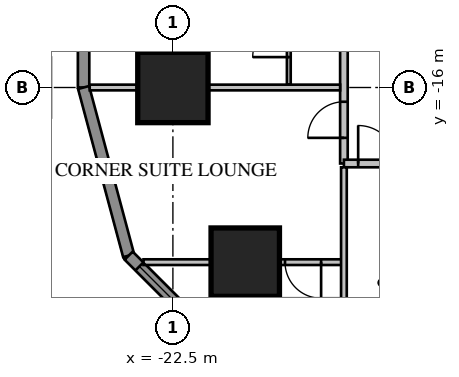
"""IFC4 building model, lengths in metres.
Left out: names, types, materials, properties, quantities, classifications, styles, units other than length and angle.
Written with IfcOpenShell. Run it as: python <this file> out.ifc"""

import sys

from ifc_helpers import new_model, si_unit, direction, frame, frame_2d, origin, origin_2d, place, context, subcontext, project, spatial, rectangle, extrude, element, fill, save


model = new_model("IFC4")
c1 = context("Model", 3, precision=1e-05, world=origin(), true_north=direction((0.0, 1.0)))
c2 = subcontext(c1, "Body", "Model", "MODEL_VIEW")
j1 = project(units=[si_unit("LENGTHUNIT", "METRE"), si_unit("PLANEANGLEUNIT", "RADIAN")], contexts=[c1])
p1 = place(None, origin())
s1 = spatial("IfcSite", under=j1, at=p1, CompositionType="ELEMENT")
p2 = place(p1, origin())
s2 = spatial("IfcBuilding", under=s1, at=p2, CompositionType="ELEMENT")
p3 = place(p2, frame((0.0, 0.0, 39.1)))
s3 = spatial("IfcBuildingStorey", under=s2, at=p3, CompositionType="ELEMENT", Elevation=39.1)
p4 = place(p3, frame((-22.5, -16.0, 0.0), z_axis=(0.0, 0.0, 1.0), x_axis=(1.0, 0.0, 0.0)))
e1 = element("IfcColumn", 1, at=p4, inside=s3, PredefinedType="COLUMN", context=c2, shape_type="SweptSolid", body=[
    extrude(rectangle(XDim=1.85, YDim=1.85, at=origin_2d()), origin(), (0.0, 0.0, 1.0), 3.85),
])
p5 = place(p3, frame((-20.596, -20.596, 0.0), z_axis=(0.0, 0.0, 1.0), x_axis=(1.0, 0.0, 0.0)))
e2 = element("IfcColumn", 2, at=p5, inside=s3, PredefinedType="COLUMN", context=c2, shape_type="SweptSolid", body=[
    extrude(rectangle(XDim=1.8, YDim=1.8, at=origin_2d()), origin(), (0.0, 0.0, 1.0), 3.85),
])
p6 = place(p3, frame((-24.85, 16.0, 0.0), z_axis=(0.0, 0.0, 1.0), x_axis=(0.0, -1.0, 0.0)))
e3 = element("IfcWall", 3, at=p6, inside=s3, PredefinedType="SOLIDWALL", context=c2, shape_type="SweptSolid", body=[
    extrude(rectangle(XDim=32.0, YDim=0.3, at=frame_2d((16.0, 0.0))), origin(), (0.0, 0.0, 1.0), 3.65),
])
p7 = place(p6, frame((1.2, 0.0, 0.75)))
e4 = element("IfcOpeningElement", 4, at=p7, cuts=e3, PredefinedType="OPENING", context=c2, shape_type="SweptSolid", body=[
    extrude(rectangle(XDim=1.6, YDim=1.8, at=frame_2d((0.8, 0.9))), frame((0.0, 0.17, 0.0), z_axis=(0.0, -1.0, 0.0), x_axis=(1.0, 0.0, 0.0)), (0.0, 0.0, 1.0), 0.34),
])
p8 = place(p6, frame((5.2, 0.0, 0.75)))
e5 = element("IfcOpeningElement", 5, at=p8, cuts=e3, PredefinedType="OPENING", context=c2, shape_type="SweptSolid", body=[
    extrude(rectangle(XDim=1.6, YDim=1.8, at=frame_2d((0.8, 0.9))), frame((0.0, 0.17, 0.0), z_axis=(0.0, -1.0, 0.0), x_axis=(1.0, 0.0, 0.0)), (0.0, 0.0, 1.0), 0.34),
])
p9 = place(p6, frame((17.2, 0.0, 0.75)))
e6 = element("IfcOpeningElement", 6, at=p9, cuts=e3, PredefinedType="OPENING", context=c2, shape_type="SweptSolid", body=[
    extrude(rectangle(XDim=1.6, YDim=1.8, at=frame_2d((0.8, 0.9))), frame((0.0, 0.17, 0.0), z_axis=(0.0, -1.0, 0.0), x_axis=(1.0, 0.0, 0.0)), (0.0, 0.0, 1.0), 0.34),
])
p10 = place(p6, frame((21.2, 0.0, 0.75)))
e7 = element("IfcOpeningElement", 7, at=p10, cuts=e3, PredefinedType="OPENING", context=c2, shape_type="SweptSolid", body=[
    extrude(rectangle(XDim=1.6, YDim=1.8, at=frame_2d((0.8, 0.9))), frame((0.0, 0.17, 0.0), z_axis=(0.0, -1.0, 0.0), x_axis=(1.0, 0.0, 0.0)), (0.0, 0.0, 1.0), 0.34),
])
p11 = place(p6, frame((25.2, 0.0, 0.75)))
e8 = element("IfcOpeningElement", 8, at=p11, cuts=e3, PredefinedType="OPENING", context=c2, shape_type="SweptSolid", body=[
    extrude(rectangle(XDim=1.6, YDim=1.8, at=frame_2d((0.8, 0.9))), frame((0.0, 0.17, 0.0), z_axis=(0.0, -1.0, 0.0), x_axis=(1.0, 0.0, 0.0)), (0.0, 0.0, 1.0), 0.34),
])
p12 = place(p6, frame((29.2, 0.0, 0.75)))
e9 = element("IfcOpeningElement", 9, at=p12, cuts=e3, PredefinedType="OPENING", context=c2, shape_type="SweptSolid", body=[
    extrude(rectangle(XDim=1.6, YDim=1.8, at=frame_2d((0.8, 0.9))), frame((0.0, 0.17, 0.0), z_axis=(0.0, -1.0, 0.0), x_axis=(1.0, 0.0, 0.0)), (0.0, 0.0, 1.0), 0.34),
])
p13 = place(p6, frame((8.8, 0.0, 0.75)))
e10 = element("IfcOpeningElement", 10, at=p13, cuts=e3, PredefinedType="OPENING", context=c2, shape_type="SweptSolid", body=[
    extrude(rectangle(XDim=2.4, YDim=1.8, at=frame_2d((1.2, 0.9))), frame((0.0, 0.17, 0.0), z_axis=(0.0, -1.0, 0.0), x_axis=(1.0, 0.0, 0.0)), (0.0, 0.0, 1.0), 0.34),
])
p14 = place(p6, frame((13.812, 0.0, 0.0)))
e11 = element("IfcOpeningElement", 11, at=p14, cuts=e3, PredefinedType="OPENING", context=c2, shape_type="SweptSolid", body=[
    extrude(rectangle(XDim=1.0, YDim=2.4, at=frame_2d((0.5, 1.2))), frame((0.0, 0.17, 0.0), z_axis=(0.0, -1.0, 0.0), x_axis=(1.0, 0.0, 0.0)), (0.0, 0.0, 1.0), 0.34),
])
p15 = place(p3, frame((-24.85, -16.0, 0.0), z_axis=(0.0, 0.0, 1.0), x_axis=(0.258839972501, -0.965920218567, 0.0)))
e12 = element("IfcWall", 12, at=p15, inside=s3, PredefinedType="SOLIDWALL", context=c2, shape_type="SweptSolid", body=[
    extrude(rectangle(XDim=4.581, YDim=0.3, at=frame_2d((2.291, 0.0))), origin(), (0.0, 0.0, 1.0), 3.65),
])
p16 = place(p3, frame((-23.664, -20.425, 0.0), z_axis=(0.0, 0.0, 1.0), x_axis=(0.707106781187, -0.707106781187, 0.0)))
e13 = element("IfcWall", 13, at=p16, inside=s3, PredefinedType="SOLIDWALL", context=c2, shape_type="SweptSolid", body=[
    extrude(rectangle(XDim=4.581, YDim=0.3, at=frame_2d((2.291, 0.0))), origin(), (0.0, 0.0, 1.0), 3.65),
])
p17 = place(p16, frame((0.4, 0.0, 0.75)))
e14 = element("IfcOpeningElement", 14, at=p17, cuts=e13, PredefinedType="OPENING", context=c2, shape_type="SweptSolid", body=[
    extrude(rectangle(XDim=3.781, YDim=1.8, at=frame_2d((1.891, 0.9))), frame((0.0, 0.17, 0.0), z_axis=(0.0, -1.0, 0.0), x_axis=(1.0, 0.0, 0.0)), (0.0, 0.0, 1.0), 0.34),
])
p18 = place(p3, frame((-18.0, 18.0, 0.0), z_axis=(0.0, 0.0, 1.0), x_axis=(0.0, -1.0, 0.0)))
e15 = element("IfcWall", 15, at=p18, inside=s3, PredefinedType="PARTITIONING", context=c2, shape_type="SweptSolid", body=[
    extrude(rectangle(XDim=36.0, YDim=0.2, at=frame_2d((18.0, 0.0))), origin(), (0.0, 0.0, 1.0), 3.65),
])
p19 = place(p18, frame((10.4, 0.0, 0.0)))
e16 = element("IfcOpeningElement", 16, at=p19, cuts=e15, PredefinedType="OPENING", context=c2, shape_type="SweptSolid", body=[
    extrude(rectangle(XDim=1.0, YDim=2.1, at=frame_2d((0.5, 1.05))), frame((0.0, 0.12, 0.0), z_axis=(0.0, -1.0, 0.0), x_axis=(1.0, 0.0, 0.0)), (0.0, 0.0, 1.0), 0.24),
])
p20 = place(p18, frame((0.375, 0.0, 0.0)))
e17 = element("IfcOpeningElement", 17, at=p20, cuts=e15, PredefinedType="OPENING", context=c2, shape_type="SweptSolid", body=[
    extrude(rectangle(XDim=1.0, YDim=2.1, at=frame_2d((0.5, 1.05))), frame((0.0, 0.12, 0.0), z_axis=(0.0, -1.0, 0.0), x_axis=(1.0, 0.0, 0.0)), (0.0, 0.0, 1.0), 0.24),
])
p21 = place(p18, frame((34.375, 0.0, 0.0)))
e18 = element("IfcOpeningElement", 18, at=p21, cuts=e15, PredefinedType="OPENING", context=c2, shape_type="SweptSolid", body=[
    extrude(rectangle(XDim=0.95, YDim=2.1, at=frame_2d((0.475, 1.05))), frame((0.0, 0.12, 0.0), z_axis=(0.0, -1.0, 0.0), x_axis=(1.0, 0.0, 0.0)), (0.0, 0.0, 1.0), 0.24),
])
p22 = place(p3, frame((-19.45, 15.925, 0.0), z_axis=(0.0, 0.0, 1.0), x_axis=(0.0, -1.0, 0.0)))
e19 = element("IfcWall", 19, at=p22, inside=s3, PredefinedType="PARTITIONING", context=c2, shape_type="SweptSolid", body=[
    extrude(rectangle(XDim=31.85, YDim=0.1, at=frame_2d((15.925, 0.0))), origin(), (0.0, 0.0, 1.0), 3.65),
])
p23 = place(p22, frame((10.125, 0.0, 0.0)))
e20 = element("IfcOpeningElement", 20, at=p23, cuts=e19, PredefinedType="OPENING", context=c2, shape_type="SweptSolid", body=[
    extrude(rectangle(XDim=1.0, YDim=2.1, at=frame_2d((0.5, 1.05))), frame((0.0, 0.07, 0.0), z_axis=(0.0, -1.0, 0.0), x_axis=(1.0, 0.0, 0.0)), (0.0, 0.0, 1.0), 0.14),
])
p24 = place(p22, frame((8.3, 0.0, 0.0)))
e21 = element("IfcOpeningElement", 21, at=p24, cuts=e19, PredefinedType="OPENING", context=c2, shape_type="SweptSolid", body=[
    extrude(rectangle(XDim=0.8, YDim=2.1, at=frame_2d((0.4, 1.05))), frame((0.0, 0.07, 0.0), z_axis=(0.0, -1.0, 0.0), x_axis=(1.0, 0.0, 0.0)), (0.0, 0.0, 1.0), 0.14),
])
p25 = place(p22, frame((0.3, 0.0, 0.0)))
e22 = element("IfcOpeningElement", 22, at=p25, cuts=e19, PredefinedType="OPENING", context=c2, shape_type="SweptSolid", body=[
    extrude(rectangle(XDim=0.95, YDim=2.1, at=frame_2d((0.475, 1.05))), frame((0.0, 0.07, 0.0), z_axis=(0.0, -1.0, 0.0), x_axis=(1.0, 0.0, 0.0)), (0.0, 0.0, 1.0), 0.14),
])
p26 = place(p22, frame((6.175, 0.0, 0.0)))
e23 = element("IfcOpeningElement", 23, at=p26, cuts=e19, PredefinedType="OPENING", context=c2, shape_type="SweptSolid", body=[
    extrude(rectangle(XDim=0.95, YDim=2.1, at=frame_2d((0.475, 1.05))), frame((0.0, 0.07, 0.0), z_axis=(0.0, -1.0, 0.0), x_axis=(1.0, 0.0, 0.0)), (0.0, 0.0, 1.0), 0.14),
])
p27 = place(p22, frame((16.3, 0.0, 0.0)))
e24 = element("IfcOpeningElement", 24, at=p27, cuts=e19, PredefinedType="OPENING", context=c2, shape_type="SweptSolid", body=[
    extrude(rectangle(XDim=0.95, YDim=2.1, at=frame_2d((0.475, 1.05))), frame((0.0, 0.07, 0.0), z_axis=(0.0, -1.0, 0.0), x_axis=(1.0, 0.0, 0.0)), (0.0, 0.0, 1.0), 0.14),
])
p28 = place(p22, frame((22.175, 0.0, 0.0)))
e25 = element("IfcOpeningElement", 25, at=p28, cuts=e19, PredefinedType="OPENING", context=c2, shape_type="SweptSolid", body=[
    extrude(rectangle(XDim=0.95, YDim=2.1, at=frame_2d((0.475, 1.05))), frame((0.0, 0.07, 0.0), z_axis=(0.0, -1.0, 0.0), x_axis=(1.0, 0.0, 0.0)), (0.0, 0.0, 1.0), 0.14),
])
p29 = place(p22, frame((24.3, 0.0, 0.0)))
e26 = element("IfcOpeningElement", 26, at=p29, cuts=e19, PredefinedType="OPENING", context=c2, shape_type="SweptSolid", body=[
    extrude(rectangle(XDim=0.95, YDim=2.1, at=frame_2d((0.475, 1.05))), frame((0.0, 0.07, 0.0), z_axis=(0.0, -1.0, 0.0), x_axis=(1.0, 0.0, 0.0)), (0.0, 0.0, 1.0), 0.14),
])
p30 = place(p22, frame((30.175, 0.0, 0.0)))
e27 = element("IfcOpeningElement", 27, at=p30, cuts=e19, PredefinedType="OPENING", context=c2, shape_type="SweptSolid", body=[
    extrude(rectangle(XDim=0.95, YDim=2.1, at=frame_2d((0.475, 1.05))), frame((0.0, 0.07, 0.0), z_axis=(0.0, -1.0, 0.0), x_axis=(1.0, 0.0, 0.0)), (0.0, 0.0, 1.0), 0.14),
])
p31 = place(p3, frame((-18.1, -16.0, 0.0), z_axis=(0.0, 0.0, 1.0), x_axis=(-1.0, 0.0, 0.0)))
e28 = element("IfcWall", 28, at=p31, inside=s3, PredefinedType="PARTITIONING", context=c2, shape_type="SweptSolid", body=[
    extrude(rectangle(XDim=6.589, YDim=0.15, at=frame_2d((3.295, 0.0))), origin(), (0.0, 0.0, 1.0), 3.65),
])
p32 = place(p3, frame((-18.065, -20.596, 0.0), z_axis=(0.0, 0.0, 1.0), x_axis=(-1.0, 0.0, 0.0)))
e29 = element("IfcWall", 29, at=p32, inside=s3, PredefinedType="PARTITIONING", context=c2, shape_type="SweptSolid", body=[
    extrude(rectangle(XDim=5.209, YDim=0.15, at=frame_2d((2.604, 0.0))), origin(), (0.0, 0.0, 1.0), 3.65),
])
p33 = place(p32, frame((0.535, 0.0, 0.0)))
e30 = element("IfcOpeningElement", 30, at=p33, cuts=e29, PredefinedType="OPENING", context=c2, shape_type="SweptSolid", body=[
    extrude(rectangle(XDim=0.95, YDim=2.1, at=frame_2d((0.475, 1.05))), frame((0.0, 0.095, 0.0), z_axis=(0.0, -1.0, 0.0), x_axis=(1.0, 0.0, 0.0)), (0.0, 0.0, 1.0), 0.19),
])
p34 = place(p3, frame((-18.0, -18.0, 0.0), z_axis=(0.0, 0.0, 1.0), x_axis=(1.0, 0.0, 0.0)))
e31 = element("IfcWall", 31, at=p34, inside=s3, PredefinedType="PARTITIONING", context=c2, shape_type="SweptSolid", body=[
    extrude(rectangle(XDim=36.0, YDim=0.2, at=frame_2d((18.0, 0.0))), origin(), (0.0, 0.0, 1.0), 3.65),
])
p35 = place(p34, frame((0.375, 0.0, 0.0)))
e32 = element("IfcOpeningElement", 32, at=p35, cuts=e31, PredefinedType="OPENING", context=c2, shape_type="SweptSolid", body=[
    extrude(rectangle(XDim=1.0, YDim=2.1, at=frame_2d((0.5, 1.05))), frame((0.0, 0.12, 0.0), z_axis=(0.0, -1.0, 0.0), x_axis=(1.0, 0.0, 0.0)), (0.0, 0.0, 1.0), 0.24),
])
p36 = place(p34, frame((2.45, 0.0, 0.0)))
e33 = element("IfcOpeningElement", 33, at=p36, cuts=e31, PredefinedType="OPENING", context=c2, shape_type="SweptSolid", body=[
    extrude(rectangle(XDim=0.8, YDim=2.1, at=frame_2d((0.4, 1.05))), frame((0.0, 0.12, 0.0), z_axis=(0.0, -1.0, 0.0), x_axis=(1.0, 0.0, 0.0)), (0.0, 0.0, 1.0), 0.24),
])
p37 = place(p34, frame((4.05, 0.0, 0.0)))
e34 = element("IfcOpeningElement", 34, at=p37, cuts=e31, PredefinedType="OPENING", context=c2, shape_type="SweptSolid", body=[
    extrude(rectangle(XDim=1.0, YDim=2.1, at=frame_2d((0.5, 1.05))), frame((0.0, 0.12, 0.0), z_axis=(0.0, -1.0, 0.0), x_axis=(1.0, 0.0, 0.0)), (0.0, 0.0, 1.0), 0.24),
])
p38 = place(p34, frame((6.45, 0.0, 0.0)))
e35 = element("IfcOpeningElement", 35, at=p38, cuts=e31, PredefinedType="OPENING", context=c2, shape_type="SweptSolid", body=[
    extrude(rectangle(XDim=0.9, YDim=2.1, at=frame_2d((0.45, 1.05))), frame((0.0, 0.12, 0.0), z_axis=(0.0, -1.0, 0.0), x_axis=(1.0, 0.0, 0.0)), (0.0, 0.0, 1.0), 0.24),
])
p39 = place(p34, frame((8.15, 0.0, 0.0)))
e36 = element("IfcOpeningElement", 36, at=p39, cuts=e31, PredefinedType="OPENING", context=c2, shape_type="SweptSolid", body=[
    extrude(rectangle(XDim=1.0, YDim=2.1, at=frame_2d((0.5, 1.05))), frame((0.0, 0.12, 0.0), z_axis=(0.0, -1.0, 0.0), x_axis=(1.0, 0.0, 0.0)), (0.0, 0.0, 1.0), 0.24),
])
p40 = place(p34, frame((18.375, 0.0, 0.0)))
e37 = element("IfcOpeningElement", 37, at=p40, cuts=e31, PredefinedType="OPENING", context=c2, shape_type="SweptSolid", body=[
    extrude(rectangle(XDim=0.95, YDim=2.1, at=frame_2d((0.475, 1.05))), frame((0.0, 0.12, 0.0), z_axis=(0.0, -1.0, 0.0), x_axis=(1.0, 0.0, 0.0)), (0.0, 0.0, 1.0), 0.24),
])
p41 = place(p34, frame((24.25, 0.0, 0.0)))
e38 = element("IfcOpeningElement", 38, at=p41, cuts=e31, PredefinedType="OPENING", context=c2, shape_type="SweptSolid", body=[
    extrude(rectangle(XDim=0.95, YDim=2.1, at=frame_2d((0.475, 1.05))), frame((0.0, 0.12, 0.0), z_axis=(0.0, -1.0, 0.0), x_axis=(1.0, 0.0, 0.0)), (0.0, 0.0, 1.0), 0.24),
])
p42 = place(p34, frame((26.375, 0.0, 0.0)))
e39 = element("IfcOpeningElement", 39, at=p42, cuts=e31, PredefinedType="OPENING", context=c2, shape_type="SweptSolid", body=[
    extrude(rectangle(XDim=0.95, YDim=2.1, at=frame_2d((0.475, 1.05))), frame((0.0, 0.12, 0.0), z_axis=(0.0, -1.0, 0.0), x_axis=(1.0, 0.0, 0.0)), (0.0, 0.0, 1.0), 0.24),
])
p43 = place(p34, frame((32.25, 0.0, 0.0)))
e40 = element("IfcOpeningElement", 40, at=p43, cuts=e31, PredefinedType="OPENING", context=c2, shape_type="SweptSolid", body=[
    extrude(rectangle(XDim=0.95, YDim=2.1, at=frame_2d((0.475, 1.05))), frame((0.0, 0.12, 0.0), z_axis=(0.0, -1.0, 0.0), x_axis=(1.0, 0.0, 0.0)), (0.0, 0.0, 1.0), 0.24),
])
p44 = place(p34, frame((34.375, 0.0, 0.0)))
e41 = element("IfcOpeningElement", 41, at=p44, cuts=e31, PredefinedType="OPENING", context=c2, shape_type="SweptSolid", body=[
    extrude(rectangle(XDim=0.95, YDim=2.1, at=frame_2d((0.475, 1.05))), frame((0.0, 0.12, 0.0), z_axis=(0.0, -1.0, 0.0), x_axis=(1.0, 0.0, 0.0)), (0.0, 0.0, 1.0), 0.24),
])
p45 = place(p34, frame((11.2, 0.0, 0.0)))
e42 = element("IfcOpeningElement", 42, at=p45, cuts=e31, PredefinedType="OPENING", context=c2, shape_type="SweptSolid", body=[
    extrude(rectangle(XDim=1.0, YDim=2.1, at=frame_2d((0.5, 1.05))), frame((0.0, 0.12, 0.0), z_axis=(0.0, -1.0, 0.0), x_axis=(1.0, 0.0, 0.0)), (0.0, 0.0, 1.0), 0.24),
])
p46 = place(p3, frame((-18.0, -18.1, 0.0), z_axis=(0.0, 0.0, 1.0), x_axis=(0.0, -1.0, 0.0)))
e43 = element("IfcWall", 43, at=p46, inside=s3, PredefinedType="PARTITIONING", context=c2, shape_type="SweptSolid", body=[
    extrude(rectangle(XDim=6.053, YDim=0.15, at=frame_2d((3.027, 0.0))), origin(), (0.0, 0.0, 1.0), 3.65),
])
p47 = place(p17, origin())
e44 = element("IfcWindow", 44, at=p47, inside=s3, PartitioningType="SINGLE_PANEL", PredefinedType="WINDOW", context=c2, shape_type="SweptSolid", body=[
    extrude(rectangle(XDim=3.781, YDim=1.8, at=frame_2d((1.891, 0.9))), frame((0.0, 0.03, 0.0), z_axis=(0.0, -1.0, 0.0), x_axis=(1.0, 0.0, 0.0)), (0.0, 0.0, 1.0), 0.06),
])
fill(e14, e44)
p48 = place(p30, origin())
e45 = element("IfcDoor", 45, at=p48, inside=s3, OperationType="SINGLE_SWING_RIGHT", PredefinedType="DOOR", context=c2, shape_type="SweptSolid", body=[
    extrude(rectangle(XDim=0.95, YDim=2.1, at=frame_2d((0.475, 1.05))), frame((0.0, 0.025, 0.0), z_axis=(0.0, -1.0, 0.0), x_axis=(1.0, 0.0, 0.0)), (0.0, 0.0, 1.0), 0.05),
])
fill(e27, e45)
p49 = place(p21, origin())
e46 = element("IfcDoor", 46, at=p49, inside=s3, OperationType="SINGLE_SWING_RIGHT", PredefinedType="DOOR", context=c2, shape_type="SweptSolid", body=[
    extrude(rectangle(XDim=0.95, YDim=2.1, at=frame_2d((0.475, 1.05))), frame((0.0, 0.025, 0.0), z_axis=(0.0, -1.0, 0.0), x_axis=(1.0, 0.0, 0.0)), (0.0, 0.0, 1.0), 0.05),
])
fill(e18, e46)
p50 = place(p33, origin())
e47 = element("IfcDoor", 47, at=p50, inside=s3, OperationType="SINGLE_SWING_LEFT", PredefinedType="DOOR", context=c2, shape_type="SweptSolid", body=[
    extrude(rectangle(XDim=0.95, YDim=2.1, at=frame_2d((0.475, 1.05))), frame((0.0, 0.025, 0.0), z_axis=(0.0, -1.0, 0.0), x_axis=(1.0, 0.0, 0.0)), (0.0, 0.0, 1.0), 0.05),
])
fill(e30, e47)
p51 = place(p35, origin())
e48 = element("IfcDoor", 48, at=p51, inside=s3, OperationType="SINGLE_SWING_LEFT", PredefinedType="DOOR", context=c2, shape_type="SweptSolid", body=[
    extrude(rectangle(XDim=1.0, YDim=2.1, at=frame_2d((0.5, 1.05))), frame((0.0, 0.025, 0.0), z_axis=(0.0, -1.0, 0.0), x_axis=(1.0, 0.0, 0.0)), (0.0, 0.0, 1.0), 0.05),
])
fill(e32, e48)
save(model, sys.argv[1])
